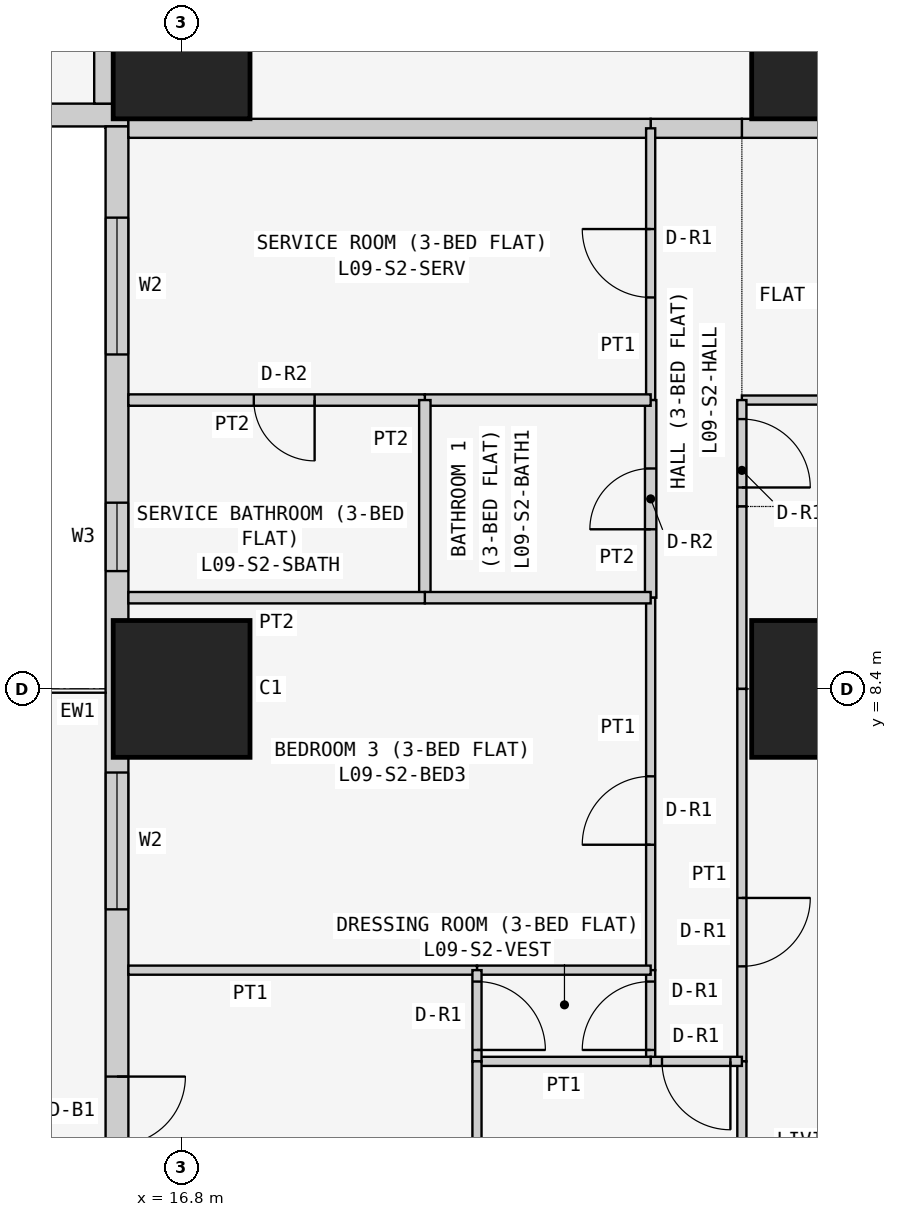
"""IFC4 building model, lengths in metres.
Left out: names, types, materials, properties, quantities, classifications, styles, units other than length and angle.
Written with IfcOpenShell. Run it as: python <this file> out.ifc"""

import sys

from ifc_helpers import new_model, si_unit, direction, frame, frame_2d, origin, origin_2d, place, context, subcontext, project, spatial, rectangle, extrude, element, fill, save


model = new_model("IFC4")
c1 = context("Model", 3, precision=1e-05, world=origin(), true_north=direction((0.0, 1.0)))
c2 = subcontext(c1, "Body", "Model", "MODEL_VIEW")
j1 = project(units=[si_unit("LENGTHUNIT", "METRE"), si_unit("PLANEANGLEUNIT", "RADIAN")], contexts=[c1])
p1 = place(None, origin())
s1 = spatial("IfcSite", under=j1, at=p1, CompositionType="ELEMENT")
p2 = place(p1, origin())
s2 = spatial("IfcBuilding", under=s1, at=p2, CompositionType="ELEMENT")
p3 = place(p2, frame((0.0, 0.0, 41.7)))
s3 = spatial("IfcBuildingStorey", under=s2, at=p3, CompositionType="ELEMENT", Elevation=41.7)
for number, where, z_axis, x_axis in (
    (1, (16.8, 8.4, 0.0), (0.0, 0.0, 1.0), (1.0, 0.0, 0.0)),
    (2, (16.8, 16.8, 0.0), (0.0, 0.0, 1.0), (1.0, 0.0, 0.0)),
    (3, (25.2, 8.4, 0.0), (0.0, 0.0, 1.0), (1.0, 0.0, 0.0)),
    (4, (25.2, 16.8, 0.0), (0.0, 0.0, 1.0), (1.0, 0.0, 0.0)),
):
    element("IfcColumn", number, at=place(p3, frame(where, z_axis=z_axis, x_axis=x_axis)), inside=s3, PredefinedType="COLUMN", context=c2, shape_type="SweptSolid", body=[
        extrude(rectangle(XDim=1.8, YDim=1.8, at=origin_2d()), origin(), (0.0, 0.0, 1.0), 3.6),
    ])
p4 = place(p3, frame((0.4, 15.95, 0.0), z_axis=(0.0, 0.0, 1.0), x_axis=(1.0, 0.0, 0.0)))
e5 = element("IfcWall", 5, at=p4, inside=s3, PredefinedType="SOLIDWALL", context=c2, shape_type="SweptSolid", body=[
    extrude(rectangle(XDim=15.7, YDim=0.3, at=frame_2d((7.85, 0.0))), origin(), (0.0, 0.0, 1.0), 3.45),
])
p5 = place(p4, frame((12.4, 0.0, 0.9)))
e6 = element("IfcOpeningElement", 6, at=p5, cuts=e5, PredefinedType="OPENING", context=c2, shape_type="SweptSolid", body=[
    extrude(rectangle(XDim=1.8, YDim=1.5, at=frame_2d((0.9, 0.75))), frame((0.0, 0.16, 0.0), z_axis=(0.0, -1.0, 0.0), x_axis=(1.0, 0.0, 0.0)), (0.0, 0.0, 1.0), 0.32),
])
p6 = place(p4, frame((9.55, 0.0, 1.5)))
e7 = element("IfcOpeningElement", 7, at=p6, cuts=e5, PredefinedType="OPENING", context=c2, shape_type="SweptSolid", body=[
    extrude(rectangle(XDim=0.9, YDim=0.7, at=frame_2d((0.45, 0.35))), frame((0.0, 0.16, 0.0), z_axis=(0.0, -1.0, 0.0), x_axis=(1.0, 0.0, 0.0)), (0.0, 0.0, 1.0), 0.32),
])
p7 = place(p4, frame((5.1, 0.0, 0.9)))
e8 = element("IfcOpeningElement", 8, at=p7, cuts=e5, PredefinedType="OPENING", context=c2, shape_type="SweptSolid", body=[
    extrude(rectangle(XDim=1.8, YDim=1.5, at=frame_2d((0.9, 0.75))), frame((0.0, 0.16, 0.0), z_axis=(0.0, -1.0, 0.0), x_axis=(1.0, 0.0, 0.0)), (0.0, 0.0, 1.0), 0.32),
])
p8 = place(p4, frame((2.0, 0.0, 0.0)))
e9 = element("IfcOpeningElement", 9, at=p8, cuts=e5, PredefinedType="OPENING", context=c2, shape_type="SweptSolid", body=[
    extrude(rectangle(XDim=0.9, YDim=2.4, at=frame_2d((0.45, 1.2))), frame((0.0, 0.16, 0.0), z_axis=(0.0, -1.0, 0.0), x_axis=(1.0, 0.0, 0.0)), (0.0, 0.0, 1.0), 0.32),
])
p9 = place(p4, frame((0.7, 0.0, 0.9)))
e10 = element("IfcOpeningElement", 10, at=p9, cuts=e5, PredefinedType="OPENING", context=c2, shape_type="SweptSolid", body=[
    extrude(rectangle(XDim=1.2, YDim=1.5, at=frame_2d((0.6, 0.75))), frame((0.0, 0.16, 0.0), z_axis=(0.0, -1.0, 0.0), x_axis=(1.0, 0.0, 0.0)), (0.0, 0.0, 1.0), 0.32),
])
p10 = place(p3, frame((15.95, 15.8, 0.0), z_axis=(0.0, 0.0, 1.0), x_axis=(0.0, -1.0, 0.0)))
e11 = element("IfcWall", 11, at=p10, inside=s3, PredefinedType="SOLIDWALL", context=c2, shape_type="SweptSolid", body=[
    extrude(rectangle(XDim=15.4, YDim=0.3, at=frame_2d((7.7, 0.0))), origin(), (0.0, 0.0, 1.0), 3.45),
])
p11 = place(p10, frame((1.2, 0.0, 0.9)))
e12 = element("IfcOpeningElement", 12, at=p11, cuts=e11, PredefinedType="OPENING", context=c2, shape_type="SweptSolid", body=[
    extrude(rectangle(XDim=1.8, YDim=1.5, at=frame_2d((0.9, 0.75))), frame((0.0, 0.16, 0.0), z_axis=(0.0, -1.0, 0.0), x_axis=(1.0, 0.0, 0.0)), (0.0, 0.0, 1.0), 0.32),
])
p12 = place(p10, frame((4.95, 0.0, 1.5)))
e13 = element("IfcOpeningElement", 13, at=p12, cuts=e11, PredefinedType="OPENING", context=c2, shape_type="SweptSolid", body=[
    extrude(rectangle(XDim=0.9, YDim=0.7, at=frame_2d((0.45, 0.35))), frame((0.0, 0.16, 0.0), z_axis=(0.0, -1.0, 0.0), x_axis=(1.0, 0.0, 0.0)), (0.0, 0.0, 1.0), 0.32),
])
p13 = place(p10, frame((8.5, 0.0, 0.9)))
e14 = element("IfcOpeningElement", 14, at=p13, cuts=e11, PredefinedType="OPENING", context=c2, shape_type="SweptSolid", body=[
    extrude(rectangle(XDim=1.8, YDim=1.5, at=frame_2d((0.9, 0.75))), frame((0.0, 0.16, 0.0), z_axis=(0.0, -1.0, 0.0), x_axis=(1.0, 0.0, 0.0)), (0.0, 0.0, 1.0), 0.32),
])
p14 = place(p10, frame((12.5, 0.0, 0.0)))
e15 = element("IfcOpeningElement", 15, at=p14, cuts=e11, PredefinedType="OPENING", context=c2, shape_type="SweptSolid", body=[
    extrude(rectangle(XDim=0.9, YDim=2.4, at=frame_2d((0.45, 1.2))), frame((0.0, 0.16, 0.0), z_axis=(0.0, -1.0, 0.0), x_axis=(1.0, 0.0, 0.0)), (0.0, 0.0, 1.0), 0.32),
])
p15 = place(p10, frame((13.5, 0.0, 0.9)))
e16 = element("IfcOpeningElement", 16, at=p15, cuts=e11, PredefinedType="OPENING", context=c2, shape_type="SweptSolid", body=[
    extrude(rectangle(XDim=1.2, YDim=1.5, at=frame_2d((0.6, 0.75))), frame((0.0, 0.16, 0.0), z_axis=(0.0, -1.0, 0.0), x_axis=(1.0, 0.0, 0.0)), (0.0, 0.0, 1.0), 0.32),
])
p16 = place(p3, frame((29.4, 15.775, 0.0), z_axis=(0.0, 0.0, 1.0), x_axis=(-1.0, 0.0, 0.0)))
e17 = element("IfcWall", 17, at=p16, inside=s3, PredefinedType="PARTITIONING", context=c2, shape_type="SweptSolid", body=[
    extrude(rectangle(XDim=5.229, YDim=0.25, at=frame_2d((2.615, 0.0))), origin(), (0.0, 0.0, 1.0), 3.45),
])
p17 = place(p16, frame((2.1, 0.0, 0.0)))
e18 = element("IfcOpeningElement", 18, at=p17, cuts=e17, PredefinedType="OPENING", context=c2, shape_type="SweptSolid", body=[
    extrude(rectangle(XDim=1.0, YDim=2.1, at=frame_2d((0.5, 1.05))), frame((0.0, 0.135, 0.0), z_axis=(0.0, -1.0, 0.0), x_axis=(1.0, 0.0, 0.0)), (0.0, 0.0, 1.0), 0.27),
])
p18 = place(p3, frame((24.171, 15.775, 0.0), z_axis=(0.0, 0.0, 1.0), x_axis=(-1.0, 0.0, 0.0)))
e19 = element("IfcWall", 19, at=p18, inside=s3, PredefinedType="PARTITIONING", context=c2, shape_type="SweptSolid", body=[
    extrude(rectangle(XDim=1.2, YDim=0.25, at=frame_2d((0.6, 0.0))), origin(), (0.0, 0.0, 1.0), 3.45),
])
for number, where, z_axis, x_axis in (
    (20, (22.971, 15.775, 0.0), (0.0, 0.0, 1.0), (-1.0, 0.0, 0.0)),
    (21, (15.775, 16.1, 0.0), (0.0, 0.0, 1.0), (0.0, 1.0, 0.0)),
):
    element("IfcWall", number, at=place(p3, frame(where, z_axis=z_axis, x_axis=x_axis)), inside=s3, PredefinedType="PARTITIONING", context=c2, shape_type="SweptSolid", body=[
        extrude(rectangle(XDim=6.871, YDim=0.25, at=frame_2d((3.436, 0.0))), origin(), (0.0, 0.0, 1.0), 3.45),
    ])
p19 = place(p3, frame((29.4, 12.2, 0.0), z_axis=(0.0, 0.0, 1.0), x_axis=(-1.0, 0.0, 0.0)))
e22 = element("IfcWall", 22, at=p19, inside=s3, PredefinedType="PARTITIONING", context=c2, shape_type="SweptSolid", body=[
    extrude(rectangle(XDim=5.229, YDim=0.12, at=frame_2d((2.615, 0.0))), origin(), (0.0, 0.0, 1.0), 3.45),
])
p20 = place(p3, frame((24.171, 10.8, 0.0), z_axis=(0.0, 0.0, 1.0), x_axis=(0.0, 1.0, 0.0)))
e23 = element("IfcWall", 23, at=p20, inside=s3, PredefinedType="PARTITIONING", context=c2, shape_type="SweptSolid", body=[
    extrude(rectangle(XDim=1.4, YDim=0.12, at=frame_2d((0.7, 0.0))), origin(), (0.0, 0.0, 1.0), 3.45),
])
p21 = place(p20, frame((0.25, 0.0, 0.0)))
e24 = element("IfcOpeningElement", 24, at=p21, cuts=e23, PredefinedType="OPENING", context=c2, shape_type="SweptSolid", body=[
    extrude(rectangle(XDim=0.9, YDim=2.1, at=frame_2d((0.45, 1.05))), frame((0.0, 0.07, 0.0), z_axis=(0.0, -1.0, 0.0), x_axis=(1.0, 0.0, 0.0)), (0.0, 0.0, 1.0), 0.14),
])
p22 = place(p3, frame((24.171, 8.4, 0.0), z_axis=(0.0, 0.0, 1.0), x_axis=(0.0, 1.0, 0.0)))
e25 = element("IfcWall", 25, at=p22, inside=s3, PredefinedType="PARTITIONING", context=c2, shape_type="SweptSolid", body=[
    extrude(rectangle(XDim=2.4, YDim=0.12, at=frame_2d((1.2, 0.0))), origin(), (0.0, 0.0, 1.0), 3.45),
])
p23 = place(p3, frame((24.171, 3.5, 0.0), z_axis=(0.0, 0.0, 1.0), x_axis=(0.0, 1.0, 0.0)))
e26 = element("IfcWall", 26, at=p23, inside=s3, PredefinedType="PARTITIONING", context=c2, shape_type="SweptSolid", body=[
    extrude(rectangle(XDim=4.9, YDim=0.12, at=frame_2d((2.45, 0.0))), origin(), (0.0, 0.0, 1.0), 3.45),
])
p24 = place(p23, frame((1.25, 0.0, 0.0)))
e27 = element("IfcOpeningElement", 27, at=p24, cuts=e26, PredefinedType="OPENING", context=c2, shape_type="SweptSolid", body=[
    extrude(rectangle(XDim=0.9, YDim=2.1, at=frame_2d((0.45, 1.05))), frame((0.0, 0.07, 0.0), z_axis=(0.0, -1.0, 0.0), x_axis=(1.0, 0.0, 0.0)), (0.0, 0.0, 1.0), 0.14),
])
p25 = place(p3, frame((24.171, -0.65, 0.0), z_axis=(0.0, 0.0, 1.0), x_axis=(0.0, 1.0, 0.0)))
e28 = element("IfcWall", 28, at=p25, inside=s3, PredefinedType="PARTITIONING", context=c2, shape_type="SweptSolid", body=[
    extrude(rectangle(XDim=4.15, YDim=0.12, at=frame_2d((2.075, 0.0))), origin(), (0.0, 0.0, 1.0), 3.45),
])
p26 = place(p3, frame((22.971, 12.2, 0.0), z_axis=(0.0, 0.0, 1.0), x_axis=(0.0, 1.0, 0.0)))
e29 = element("IfcWall", 29, at=p26, inside=s3, PredefinedType="PARTITIONING", context=c2, shape_type="SweptSolid", body=[
    extrude(rectangle(XDim=3.575, YDim=0.12, at=frame_2d((1.788, 0.0))), origin(), (0.0, 0.0, 1.0), 3.45),
])
p27 = place(p26, frame((1.35, 0.0, 0.0)))
e30 = element("IfcOpeningElement", 30, at=p27, cuts=e29, PredefinedType="OPENING", context=c2, shape_type="SweptSolid", body=[
    extrude(rectangle(XDim=0.9, YDim=2.1, at=frame_2d((0.45, 1.05))), frame((0.0, 0.07, 0.0), z_axis=(0.0, -1.0, 0.0), x_axis=(1.0, 0.0, 0.0)), (0.0, 0.0, 1.0), 0.14),
])
p28 = place(p3, frame((22.971, 9.6, 0.0), z_axis=(0.0, 0.0, 1.0), x_axis=(0.0, 1.0, 0.0)))
e31 = element("IfcWall", 31, at=p28, inside=s3, PredefinedType="PARTITIONING", context=c2, shape_type="SweptSolid", body=[
    extrude(rectangle(XDim=2.6, YDim=0.15, at=frame_2d((1.3, 0.0))), origin(), (0.0, 0.0, 1.0), 3.45),
])
p29 = place(p28, frame((0.9, 0.0, 0.0)))
e32 = element("IfcOpeningElement", 32, at=p29, cuts=e31, PredefinedType="OPENING", context=c2, shape_type="SweptSolid", body=[
    extrude(rectangle(XDim=0.8, YDim=2.1, at=frame_2d((0.4, 1.05))), frame((0.0, 0.085, 0.0), z_axis=(0.0, -1.0, 0.0), x_axis=(1.0, 0.0, 0.0)), (0.0, 0.0, 1.0), 0.17),
])
p30 = place(p3, frame((22.971, 4.7, 0.0), z_axis=(0.0, 0.0, 1.0), x_axis=(0.0, 1.0, 0.0)))
e33 = element("IfcWall", 33, at=p30, inside=s3, PredefinedType="PARTITIONING", context=c2, shape_type="SweptSolid", body=[
    extrude(rectangle(XDim=4.9, YDim=0.12, at=frame_2d((2.45, 0.0))), origin(), (0.0, 0.0, 1.0), 3.45),
])
p31 = place(p30, frame((1.65, 0.0, 0.0)))
e34 = element("IfcOpeningElement", 34, at=p31, cuts=e33, PredefinedType="OPENING", context=c2, shape_type="SweptSolid", body=[
    extrude(rectangle(XDim=0.9, YDim=2.1, at=frame_2d((0.45, 1.05))), frame((0.0, 0.07, 0.0), z_axis=(0.0, -1.0, 0.0), x_axis=(1.0, 0.0, 0.0)), (0.0, 0.0, 1.0), 0.14),
])
p32 = place(p3, frame((22.971, 3.5, 0.0), z_axis=(0.0, 0.0, 1.0), x_axis=(0.0, 1.0, 0.0)))
e35 = element("IfcWall", 35, at=p32, inside=s3, PredefinedType="PARTITIONING", context=c2, shape_type="SweptSolid", body=[
    extrude(rectangle(XDim=1.2, YDim=0.12, at=frame_2d((0.6, 0.0))), origin(), (0.0, 0.0, 1.0), 3.45),
])
p33 = place(p32, frame((0.15, 0.0, 0.0)))
e36 = element("IfcOpeningElement", 36, at=p33, cuts=e35, PredefinedType="OPENING", context=c2, shape_type="SweptSolid", body=[
    extrude(rectangle(XDim=0.9, YDim=2.1, at=frame_2d((0.45, 1.05))), frame((0.0, 0.07, 0.0), z_axis=(0.0, -1.0, 0.0), x_axis=(1.0, 0.0, 0.0)), (0.0, 0.0, 1.0), 0.14),
])
p34 = place(p3, frame((24.171, 3.5, 0.0), z_axis=(0.0, 0.0, 1.0), x_axis=(-1.0, 0.0, 0.0)))
e37 = element("IfcWall", 37, at=p34, inside=s3, PredefinedType="PARTITIONING", context=c2, shape_type="SweptSolid", body=[
    extrude(rectangle(XDim=1.2, YDim=0.12, at=frame_2d((0.6, 0.0))), origin(), (0.0, 0.0, 1.0), 3.45),
])
p35 = place(p34, frame((0.151, 0.0, 0.0)))
e38 = element("IfcOpeningElement", 38, at=p35, cuts=e37, PredefinedType="OPENING", context=c2, shape_type="SweptSolid", body=[
    extrude(rectangle(XDim=0.9, YDim=2.1, at=frame_2d((0.45, 1.05))), frame((0.0, 0.07, 0.0), z_axis=(0.0, -1.0, 0.0), x_axis=(1.0, 0.0, 0.0)), (0.0, 0.0, 1.0), 0.14),
])
p36 = place(p3, frame((22.971, 12.2, 0.0), z_axis=(0.0, 0.0, 1.0), x_axis=(-1.0, 0.0, 0.0)))
e39 = element("IfcWall", 39, at=p36, inside=s3, PredefinedType="PARTITIONING", context=c2, shape_type="SweptSolid", body=[
    extrude(rectangle(XDim=2.971, YDim=0.15, at=frame_2d((1.485, 0.0))), origin(), (0.0, 0.0, 1.0), 3.45),
])
p37 = place(p3, frame((20.0, 12.2, 0.0), z_axis=(0.0, 0.0, 1.0), x_axis=(-1.0, 0.0, 0.0)))
e40 = element("IfcWall", 40, at=p37, inside=s3, PredefinedType="PARTITIONING", context=c2, shape_type="SweptSolid", body=[
    extrude(rectangle(XDim=3.9, YDim=0.15, at=frame_2d((1.95, 0.0))), origin(), (0.0, 0.0, 1.0), 3.45),
])
p38 = place(p37, frame((1.45, 0.0, 0.0)))
e41 = element("IfcOpeningElement", 41, at=p38, cuts=e40, PredefinedType="OPENING", context=c2, shape_type="SweptSolid", body=[
    extrude(rectangle(XDim=0.8, YDim=2.1, at=frame_2d((0.4, 1.05))), frame((0.0, 0.085, 0.0), z_axis=(0.0, -1.0, 0.0), x_axis=(1.0, 0.0, 0.0)), (0.0, 0.0, 1.0), 0.17),
])
p39 = place(p3, frame((20.0, 9.6, 0.0), z_axis=(0.0, 0.0, 1.0), x_axis=(0.0, 1.0, 0.0)))
e42 = element("IfcWall", 42, at=p39, inside=s3, PredefinedType="PARTITIONING", context=c2, shape_type="SweptSolid", body=[
    extrude(rectangle(XDim=2.6, YDim=0.15, at=frame_2d((1.3, 0.0))), origin(), (0.0, 0.0, 1.0), 3.45),
])
p40 = place(p3, frame((22.971, 9.6, 0.0), z_axis=(0.0, 0.0, 1.0), x_axis=(-1.0, 0.0, 0.0)))
e43 = element("IfcWall", 43, at=p40, inside=s3, PredefinedType="PARTITIONING", context=c2, shape_type="SweptSolid", body=[
    extrude(rectangle(XDim=2.971, YDim=0.15, at=frame_2d((1.485, 0.0))), origin(), (0.0, 0.0, 1.0), 3.45),
])
p41 = place(p3, frame((20.0, 9.6, 0.0), z_axis=(0.0, 0.0, 1.0), x_axis=(-1.0, 0.0, 0.0)))
e44 = element("IfcWall", 44, at=p41, inside=s3, PredefinedType="PARTITIONING", context=c2, shape_type="SweptSolid", body=[
    extrude(rectangle(XDim=3.9, YDim=0.15, at=frame_2d((1.95, 0.0))), origin(), (0.0, 0.0, 1.0), 3.45),
])
p42 = place(p3, frame((22.971, 4.7, 0.0), z_axis=(0.0, 0.0, 1.0), x_axis=(-1.0, 0.0, 0.0)))
e45 = element("IfcWall", 45, at=p42, inside=s3, PredefinedType="PARTITIONING", context=c2, shape_type="SweptSolid", body=[
    extrude(rectangle(XDim=2.285, YDim=0.12, at=frame_2d((1.143, 0.0))), origin(), (0.0, 0.0, 1.0), 3.45),
])
p43 = place(p3, frame((20.686, 4.7, 0.0), z_axis=(0.0, 0.0, 1.0), x_axis=(-1.0, 0.0, 0.0)))
e46 = element("IfcWall", 46, at=p43, inside=s3, PredefinedType="PARTITIONING", context=c2, shape_type="SweptSolid", body=[
    extrude(rectangle(XDim=4.586, YDim=0.12, at=frame_2d((2.293, 0.0))), origin(), (0.0, 0.0, 1.0), 3.45),
])
p44 = place(p3, frame((22.971, 3.5, 0.0), z_axis=(0.0, 0.0, 1.0), x_axis=(-1.0, 0.0, 0.0)))
e47 = element("IfcWall", 47, at=p44, inside=s3, PredefinedType="PARTITIONING", context=c2, shape_type="SweptSolid", body=[
    extrude(rectangle(XDim=2.285, YDim=0.12, at=frame_2d((1.143, 0.0))), origin(), (0.0, 0.0, 1.0), 3.45),
])
p45 = place(p3, frame((20.686, 3.5, 0.0), z_axis=(0.0, 0.0, 1.0), x_axis=(0.0, 1.0, 0.0)))
e48 = element("IfcWall", 48, at=p45, inside=s3, PredefinedType="PARTITIONING", context=c2, shape_type="SweptSolid", body=[
    extrude(rectangle(XDim=1.2, YDim=0.12, at=frame_2d((0.6, 0.0))), origin(), (0.0, 0.0, 1.0), 3.45),
])
p46 = place(p45, frame((0.15, 0.0, 0.0)))
e49 = element("IfcOpeningElement", 49, at=p46, cuts=e48, PredefinedType="OPENING", context=c2, shape_type="SweptSolid", body=[
    extrude(rectangle(XDim=0.9, YDim=2.1, at=frame_2d((0.45, 1.05))), frame((0.0, 0.07, 0.0), z_axis=(0.0, -1.0, 0.0), x_axis=(1.0, 0.0, 0.0)), (0.0, 0.0, 1.0), 0.14),
])
p47 = place(p3, frame((20.686, -0.65, 0.0), z_axis=(0.0, 0.0, 1.0), x_axis=(0.0, 1.0, 0.0)))
e50 = element("IfcWall", 50, at=p47, inside=s3, PredefinedType="PARTITIONING", context=c2, shape_type="SweptSolid", body=[
    extrude(rectangle(XDim=4.15, YDim=0.12, at=frame_2d((2.075, 0.0))), origin(), (0.0, 0.0, 1.0), 3.45),
])
p48 = place(p11, origin())
e51 = element("IfcWindow", 51, at=p48, inside=s3, PartitioningType="SINGLE_PANEL", PredefinedType="WINDOW", context=c2, shape_type="SweptSolid", body=[
    extrude(rectangle(XDim=1.8, YDim=1.5, at=frame_2d((0.9, 0.75))), frame((0.0, 0.03, 0.0), z_axis=(0.0, -1.0, 0.0), x_axis=(1.0, 0.0, 0.0)), (0.0, 0.0, 1.0), 0.06),
])
fill(e12, e51)
p49 = place(p12, origin())
e52 = element("IfcWindow", 52, at=p49, inside=s3, PartitioningType="SINGLE_PANEL", PredefinedType="WINDOW", context=c2, shape_type="SweptSolid", body=[
    extrude(rectangle(XDim=0.9, YDim=0.7, at=frame_2d((0.45, 0.35))), frame((0.0, 0.03, 0.0), z_axis=(0.0, -1.0, 0.0), x_axis=(1.0, 0.0, 0.0)), (0.0, 0.0, 1.0), 0.06),
])
fill(e13, e52)
p50 = place(p13, origin())
e53 = element("IfcWindow", 53, at=p50, inside=s3, PartitioningType="SINGLE_PANEL", PredefinedType="WINDOW", context=c2, shape_type="SweptSolid", body=[
    extrude(rectangle(XDim=1.8, YDim=1.5, at=frame_2d((0.9, 0.75))), frame((0.0, 0.03, 0.0), z_axis=(0.0, -1.0, 0.0), x_axis=(1.0, 0.0, 0.0)), (0.0, 0.0, 1.0), 0.06),
])
fill(e14, e53)
p51 = place(p14, origin())
e54 = element("IfcDoor", 54, at=p51, inside=s3, OperationType="SINGLE_SWING_LEFT", PredefinedType="DOOR", context=c2, shape_type="SweptSolid", body=[
    extrude(rectangle(XDim=0.9, YDim=2.4, at=frame_2d((0.45, 1.2))), frame((0.0, 0.025, 0.0), z_axis=(0.0, -1.0, 0.0), x_axis=(1.0, 0.0, 0.0)), (0.0, 0.0, 1.0), 0.05),
])
fill(e15, e54)
p52 = place(p21, frame((0.9, 0.0, 0.0), z_axis=(0.0, 0.0, 1.0), x_axis=(-1.0, 0.0, 0.0)))
e55 = element("IfcDoor", 55, at=p52, inside=s3, OperationType="SINGLE_SWING_RIGHT", PredefinedType="DOOR", context=c2, shape_type="SweptSolid", body=[
    extrude(rectangle(XDim=0.9, YDim=2.1, at=frame_2d((0.45, 1.05))), frame((0.0, 0.025, 0.0), z_axis=(0.0, -1.0, 0.0), x_axis=(1.0, 0.0, 0.0)), (0.0, 0.0, 1.0), 0.05),
])
fill(e24, e55)
p53 = place(p24, frame((0.9, 0.0, 0.0), z_axis=(0.0, 0.0, 1.0), x_axis=(-1.0, 0.0, 0.0)))
e56 = element("IfcDoor", 56, at=p53, inside=s3, OperationType="SINGLE_SWING_LEFT", PredefinedType="DOOR", context=c2, shape_type="SweptSolid", body=[
    extrude(rectangle(XDim=0.9, YDim=2.1, at=frame_2d((0.45, 1.05))), frame((0.0, 0.025, 0.0), z_axis=(0.0, -1.0, 0.0), x_axis=(1.0, 0.0, 0.0)), (0.0, 0.0, 1.0), 0.05),
])
fill(e27, e56)
p54 = place(p27, origin())
e57 = element("IfcDoor", 57, at=p54, inside=s3, OperationType="SINGLE_SWING_RIGHT", PredefinedType="DOOR", context=c2, shape_type="SweptSolid", body=[
    extrude(rectangle(XDim=0.9, YDim=2.1, at=frame_2d((0.45, 1.05))), frame((0.0, 0.025, 0.0), z_axis=(0.0, -1.0, 0.0), x_axis=(1.0, 0.0, 0.0)), (0.0, 0.0, 1.0), 0.05),
])
fill(e30, e57)
p55 = place(p38, origin())
e58 = element("IfcDoor", 58, at=p55, inside=s3, OperationType="SINGLE_SWING_LEFT", PredefinedType="DOOR", context=c2, shape_type="SweptSolid", body=[
    extrude(rectangle(XDim=0.8, YDim=2.1, at=frame_2d((0.4, 1.05))), frame((0.0, 0.025, 0.0), z_axis=(0.0, -1.0, 0.0), x_axis=(1.0, 0.0, 0.0)), (0.0, 0.0, 1.0), 0.05),
])
fill(e41, e58)
p56 = place(p29, origin())
e59 = element("IfcDoor", 59, at=p56, inside=s3, OperationType="SINGLE_SWING_LEFT", PredefinedType="DOOR", context=c2, shape_type="SweptSolid", body=[
    extrude(rectangle(XDim=0.8, YDim=2.1, at=frame_2d((0.4, 1.05))), frame((0.0, 0.025, 0.0), z_axis=(0.0, -1.0, 0.0), x_axis=(1.0, 0.0, 0.0)), (0.0, 0.0, 1.0), 0.05),
])
fill(e32, e59)
p57 = place(p31, origin())
e60 = element("IfcDoor", 60, at=p57, inside=s3, OperationType="SINGLE_SWING_LEFT", PredefinedType="DOOR", context=c2, shape_type="SweptSolid", body=[
    extrude(rectangle(XDim=0.9, YDim=2.1, at=frame_2d((0.45, 1.05))), frame((0.0, 0.025, 0.0), z_axis=(0.0, -1.0, 0.0), x_axis=(1.0, 0.0, 0.0)), (0.0, 0.0, 1.0), 0.05),
])
fill(e34, e60)
p58 = place(p33, origin())
e61 = element("IfcDoor", 61, at=p58, inside=s3, OperationType="SINGLE_SWING_LEFT", PredefinedType="DOOR", context=c2, shape_type="SweptSolid", body=[
    extrude(rectangle(XDim=0.9, YDim=2.1, at=frame_2d((0.45, 1.05))), frame((0.0, 0.025, 0.0), z_axis=(0.0, -1.0, 0.0), x_axis=(1.0, 0.0, 0.0)), (0.0, 0.0, 1.0), 0.05),
])
fill(e36, e61)
p59 = place(p46, frame((0.9, 0.0, 0.0), z_axis=(0.0, 0.0, 1.0), x_axis=(-1.0, 0.0, 0.0)))
e62 = element("IfcDoor", 62, at=p59, inside=s3, OperationType="SINGLE_SWING_RIGHT", PredefinedType="DOOR", context=c2, shape_type="SweptSolid", body=[
    extrude(rectangle(XDim=0.9, YDim=2.1, at=frame_2d((0.45, 1.05))), frame((0.0, 0.025, 0.0), z_axis=(0.0, -1.0, 0.0), x_axis=(1.0, 0.0, 0.0)), (0.0, 0.0, 1.0), 0.05),
])
fill(e49, e62)
p60 = place(p35, origin())
e63 = element("IfcDoor", 63, at=p60, inside=s3, OperationType="SINGLE_SWING_LEFT", PredefinedType="DOOR", context=c2, shape_type="SweptSolid", body=[
    extrude(rectangle(XDim=0.9, YDim=2.1, at=frame_2d((0.45, 1.05))), frame((0.0, 0.025, 0.0), z_axis=(0.0, -1.0, 0.0), x_axis=(1.0, 0.0, 0.0)), (0.0, 0.0, 1.0), 0.05),
])
fill(e38, e63)
save(model, sys.argv[1])
